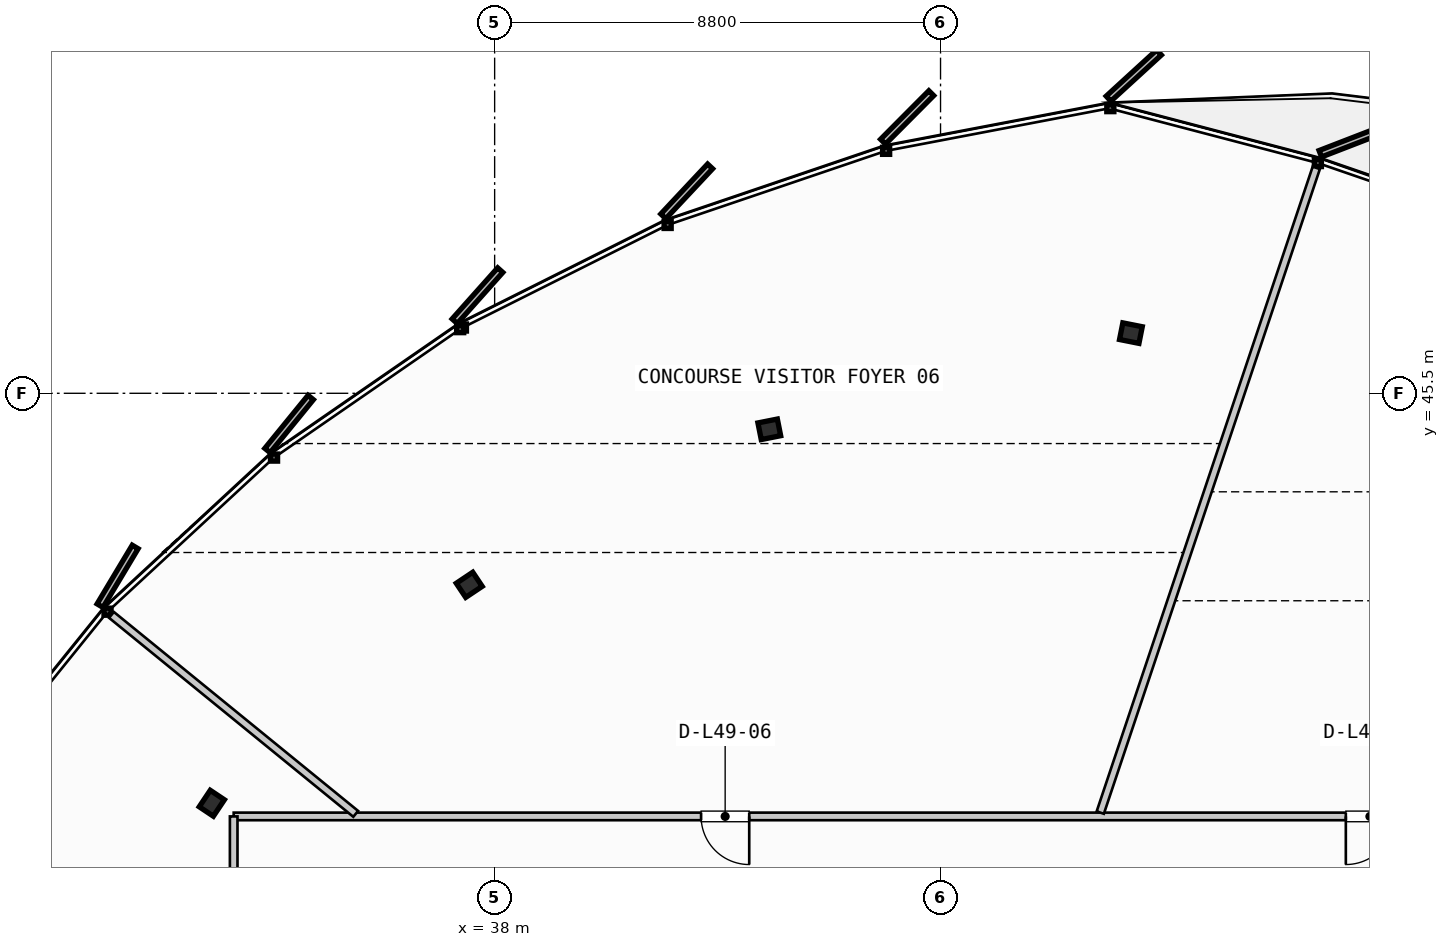
"""IFC4 building model, lengths in metres.
Left out: names, types, materials, properties, quantities, classifications, styles, units other than length and angle.
Written with IfcOpenShell. Run it as: python <this file> out.ifc"""

import sys

from ifc_helpers import new_model, si_unit, direction, frame, frame_2d, origin, origin_2d, place, context, subcontext, project, spatial, rectangle, i_section, extrude, source, transform, mapped, element, fill, save


model = new_model("IFC4")
c1 = context("Model", 3, precision=1e-05, world=origin(), true_north=direction((0.0, 1.0)))
c2 = subcontext(c1, "Body", "Model", "MODEL_VIEW")
j1 = project(units=[si_unit("LENGTHUNIT", "METRE"), si_unit("PLANEANGLEUNIT", "RADIAN")], contexts=[c1])
p1 = place(None, origin())
s1 = spatial("IfcSite", under=j1, at=p1, CompositionType="ELEMENT")
p2 = place(p1, origin())
s2 = spatial("IfcBuilding", under=s1, at=p2, CompositionType="ELEMENT")
p3 = place(p2, frame((0.0, 0.0, 190.4)))
s3 = spatial("IfcBuildingStorey", under=s2, at=p3, CompositionType="ELEMENT", Elevation=190.4)
m1 = source(origin(), c2, "Body", "SweptSolid", [
    extrude(i_section(OverallWidth=0.391, OverallDepth=0.335, WebThickness=0.023, FlangeThickness=0.034, FilletRadius=0.015, at=origin_2d()), origin(), (0.0, 0.0, 1.0), 3.26),
])
for number, where, z_axis, x_axis in (
    (1, (50.557, 46.688, 0.0), (0.0, 0.0, 1.0), (0.195, 0.981, 0.0)),
    (2, (43.421, 44.789, 0.0), (0.0, 0.0, 1.0), (-0.195, 0.981, 0.0)),
    (3, (37.499, 41.72, 0.0), (0.0, 0.0, 1.0), (-0.556, 0.831, 0.0)),
    (4, (32.418, 37.409, 0.0), (0.0, 0.0, 1.0), (-0.831, 0.556, 0.0)),
):
    element("IfcColumn", number, at=place(p3, frame(where, z_axis=z_axis, x_axis=x_axis)), inside=s3, PredefinedType="COLUMN", context=c2, shape_type="MappedRepresentation", body=[
        mapped(m1, transform((0.0, 0.0, 0.0), scale=1.0)),
    ])
p4 = place(p3, frame((61.2, 37.15, 0.0), z_axis=(0.0, 0.0, 1.0), x_axis=(-1.0, 0.0, 0.0)))
e5 = element("IfcWall", 5, at=p4, inside=s3, PredefinedType="PARTITIONING", context=c2, shape_type="SweptSolid", body=[
    extrude(rectangle(XDim=28.35, YDim=0.15, at=frame_2d((14.175, 0.0))), origin(), (0.0, 0.0, 1.0), 2.735),
])
p5 = place(p4, frame((5.451, 0.0, 0.0)))
e6 = element("IfcOpeningElement", 6, at=p5, cuts=e5, PredefinedType="OPENING", context=c2, shape_type="SweptSolid", body=[
    extrude(rectangle(XDim=0.95, YDim=2.15, at=frame_2d((0.475, 1.075))), frame((0.0, 0.085, 0.0), z_axis=(0.0, -1.0, 0.0), x_axis=(1.0, 0.0, 0.0)), (0.0, 0.0, 1.0), 0.17),
])
p6 = place(p4, frame((18.176, 0.0, 0.0)))
e7 = element("IfcOpeningElement", 7, at=p6, cuts=e5, PredefinedType="OPENING", context=c2, shape_type="SweptSolid", body=[
    extrude(rectangle(XDim=0.95, YDim=2.15, at=frame_2d((0.475, 1.075))), frame((0.0, 0.085, 0.0), z_axis=(0.0, -1.0, 0.0), x_axis=(1.0, 0.0, 0.0)), (0.0, 0.0, 1.0), 0.17),
])
p7 = place(p3, frame((32.85, 37.15, 0.0), z_axis=(0.0, 0.0, 1.0), x_axis=(0.0, -1.0, 0.0)))
e8 = element("IfcWall", 8, at=p7, inside=s3, PredefinedType="PARTITIONING", context=c2, shape_type="SweptSolid", body=[
    extrude(rectangle(XDim=2.65, YDim=0.15, at=frame_2d((1.325, 0.0))), origin(), (0.0, 0.0, 1.0), 2.735),
])
p8 = place(p3, frame((49.952, 37.226, 0.0), z_axis=(0.0, 0.0, 1.0), x_axis=(0.317695690464, 0.948192727382, 0.0)))
e9 = element("IfcWall", 9, at=p8, inside=s3, PredefinedType="PARTITIONING", context=c2, shape_type="SweptSolid", body=[
    extrude(rectangle(XDim=13.418, YDim=0.15, at=frame_2d((6.709, 0.0))), origin(), (0.0, 0.0, 1.0), 2.735),
])
p9 = place(p3, frame((35.258, 37.2, 0.0), z_axis=(0.0, 0.0, 1.0), x_axis=(-0.775328994429, 0.631557559054, 0.0)))
e10 = element("IfcWall", 10, at=p9, inside=s3, PredefinedType="PARTITIONING", context=c2, shape_type="SweptSolid", body=[
    extrude(rectangle(XDim=6.217, YDim=0.15, at=frame_2d((3.108, 0.0))), origin(), (0.0, 0.0, 1.0), 2.735),
])
m2 = source(origin(), c2, "Body", "SweptSolid", [
    extrude(rectangle(XDim=0.95, YDim=2.15, at=frame_2d((0.475, 1.075))), frame((0.0, 0.025, 0.0), z_axis=(0.0, -1.0, 0.0), x_axis=(1.0, 0.0, 0.0)), (0.0, 0.0, 1.0), 0.05),
])
p10 = place(p5, origin())
e11 = element("IfcDoor", 11, at=p10, inside=s3, OperationType="SINGLE_SWING_RIGHT", PredefinedType="DOOR", context=c2, shape_type="MappedRepresentation", body=[
    mapped(m2, transform((0.0, 0.0, 0.0), scale=1.0)),
])
fill(e6, e11)
p11 = place(p6, origin())
e12 = element("IfcDoor", 12, at=p11, inside=s3, OperationType="SINGLE_SWING_LEFT", PredefinedType="DOOR", context=c2, shape_type="MappedRepresentation", body=[
    mapped(m2, transform((0.0, 0.0, 0.0), scale=1.0)),
])
fill(e7, e12)
save(model, sys.argv[1])
